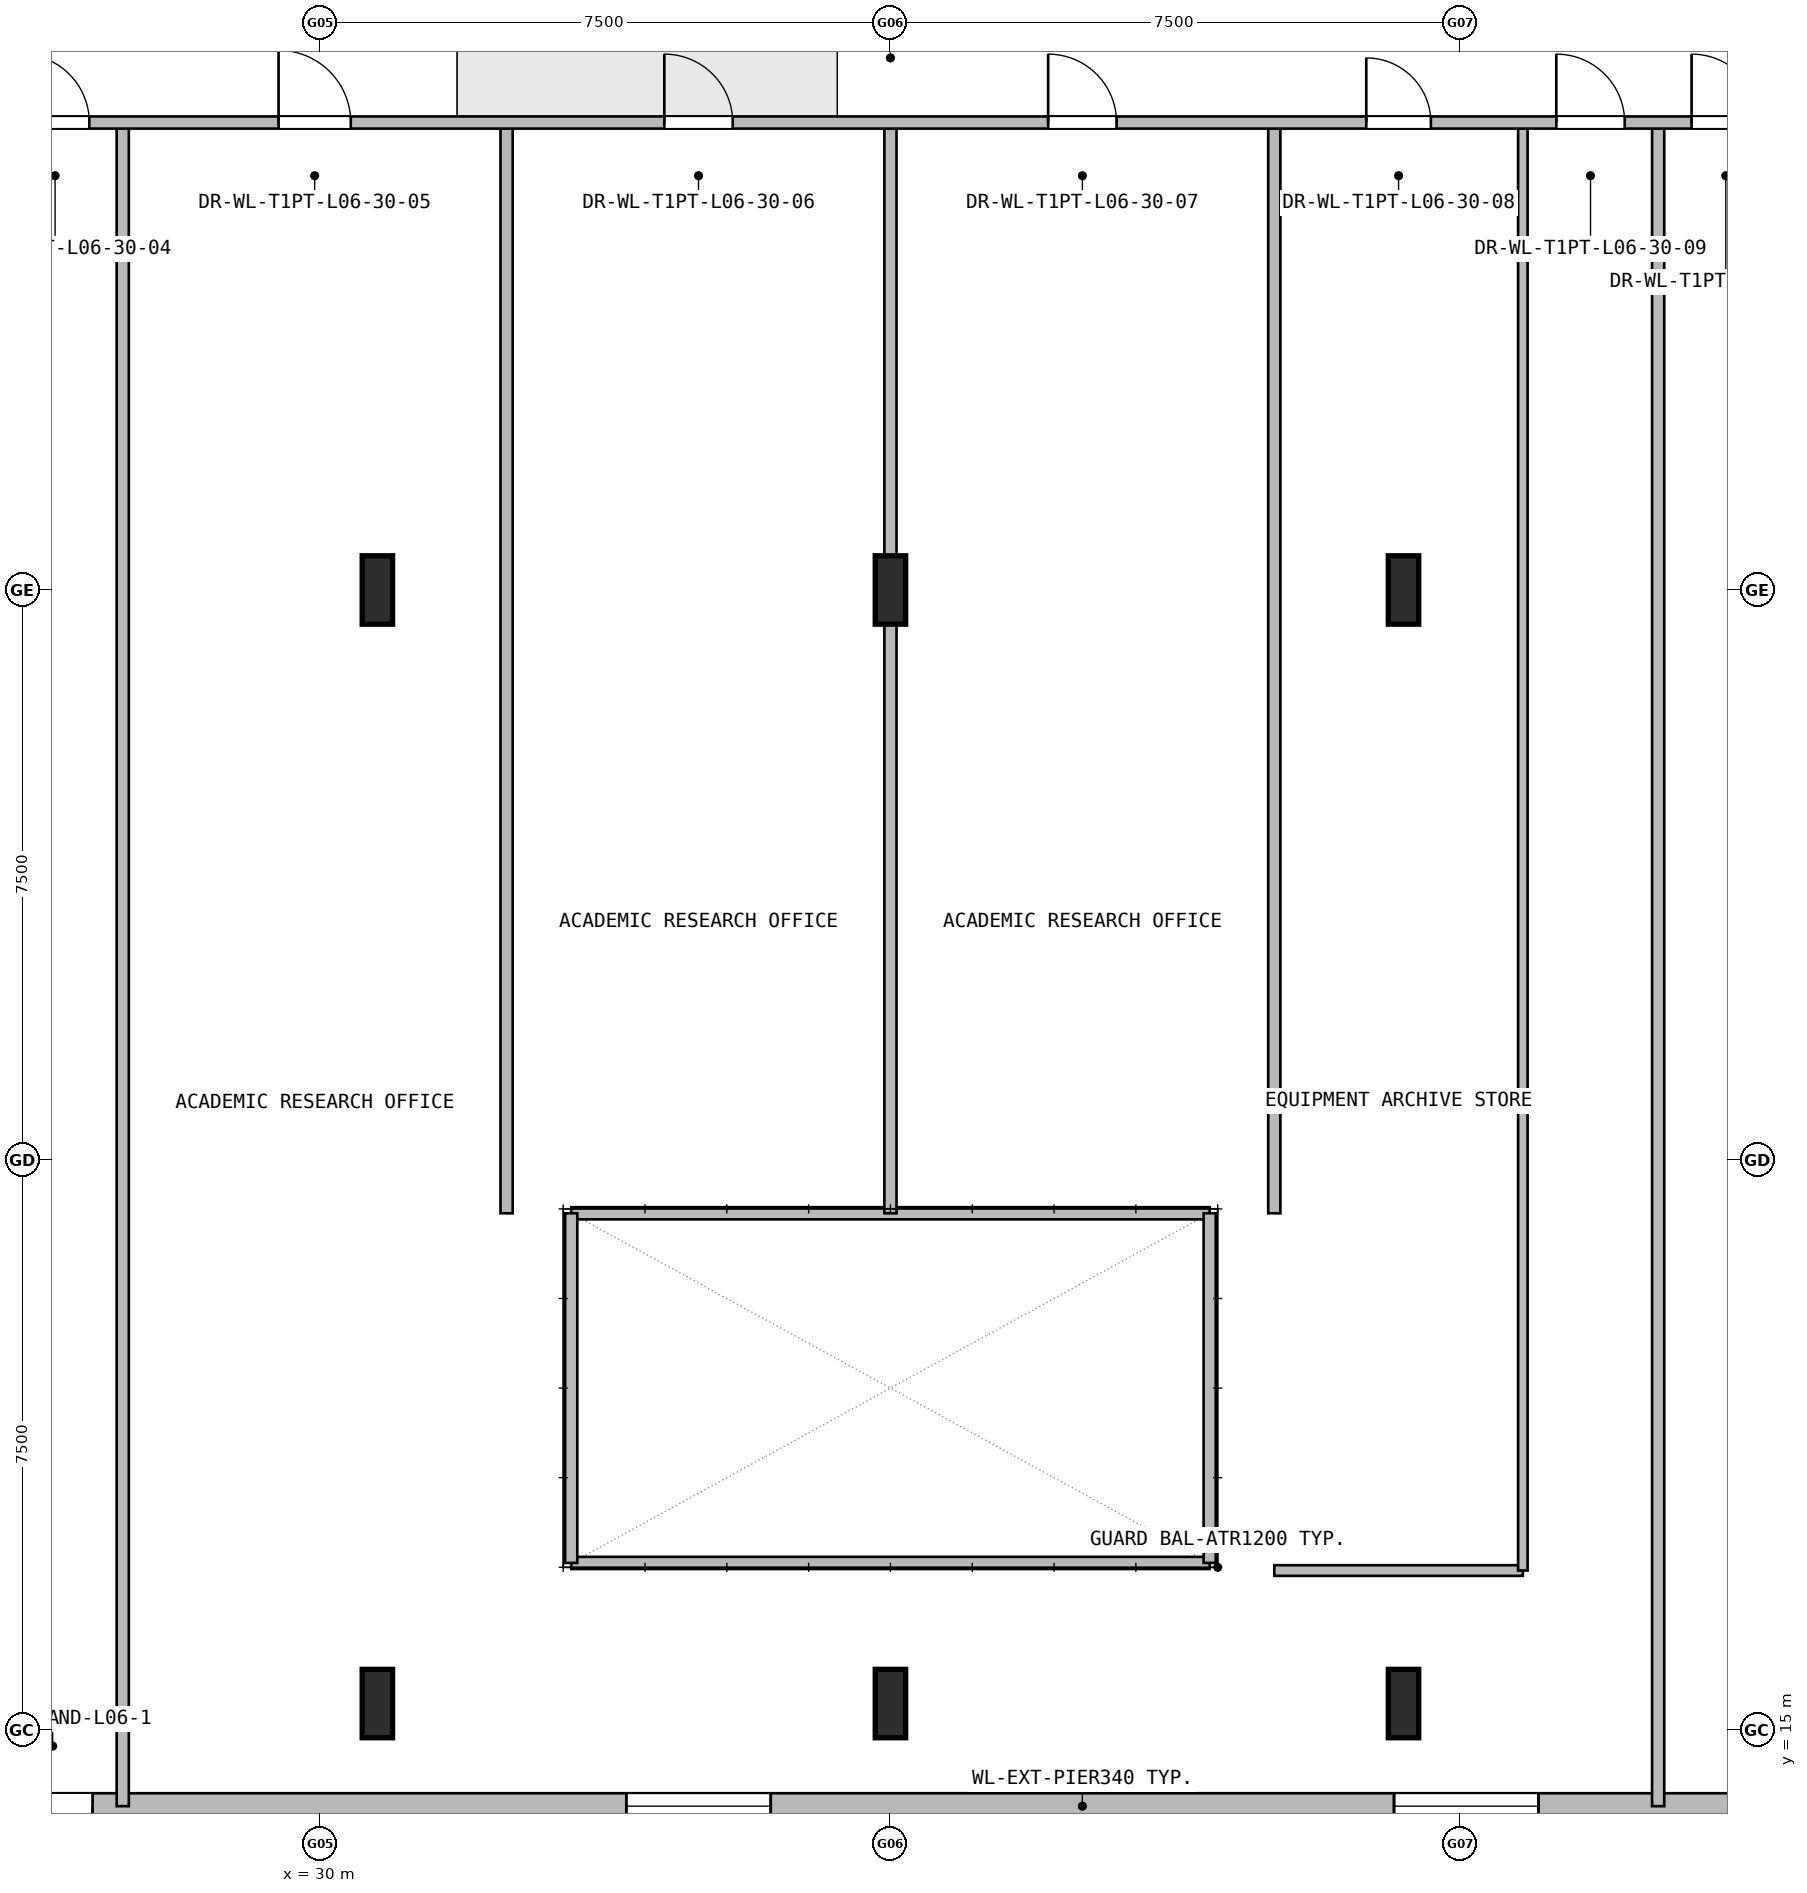
"""IFC4 building model, lengths in metres.
Left out: names, types, materials, properties, quantities, classifications, styles, units other than length and angle.
Written with IfcOpenShell. Run it as: python <this file> out.ifc"""

import sys

from ifc_helpers import new_model, si_unit, direction, frame, frame_2d, origin, origin_2d, place, context, subcontext, project, spatial, rectangle, i_section, extrude, element, fill, save


model = new_model("IFC4")
c1 = context("Model", 3, precision=1e-05, world=origin(), true_north=direction((0.0, 1.0)))
c2 = subcontext(c1, "Body", "Model", "MODEL_VIEW")
j1 = project(units=[si_unit("LENGTHUNIT", "METRE"), si_unit("PLANEANGLEUNIT", "RADIAN")], contexts=[c1])
p1 = place(None, origin())
s1 = spatial("IfcSite", under=j1, at=p1, CompositionType="ELEMENT")
p2 = place(p1, origin())
s2 = spatial("IfcBuilding", under=s1, at=p2, CompositionType="ELEMENT")
p3 = place(p2, frame((0.0, 0.0, 30.6)))
s3 = spatial("IfcBuildingStorey", under=s2, at=p3, CompositionType="ELEMENT", Elevation=30.6)
for number, where, z_axis, x_axis in (
    (1, (30.75, 15.35, 0.0), (0.0, 0.0, 1.0), (1.0, 0.0, 0.0)),
    (2, (30.75, 30.0, 0.0), (0.0, 0.0, 1.0), (1.0, 0.0, 0.0)),
):
    element("IfcColumn", number, at=place(p3, frame(where, z_axis=z_axis, x_axis=x_axis)), inside=s3, PredefinedType="COLUMN", context=c2, shape_type="SweptSolid", body=[
        extrude(i_section(OverallWidth=0.4, OverallDepth=0.9, WebThickness=0.02, FlangeThickness=0.036, at=origin_2d()), origin(), (0.0, 0.0, 1.0), 3.3),
    ])
for number, where, z_axis, x_axis in (
    (3, (37.5, 15.35, -0.25), (0.0, 0.0, 1.0), (1.0, 0.0, 0.0)),
    (4, (37.5, 30.0, -0.25), (0.0, 0.0, 1.0), (1.0, 0.0, 0.0)),
):
    element("IfcColumn", number, at=place(p3, frame(where, z_axis=z_axis, x_axis=x_axis)), inside=s3, PredefinedType="COLUMN", context=c2, shape_type="SweptSolid", body=[
        extrude(i_section(OverallWidth=0.4, OverallDepth=0.9, WebThickness=0.02, FlangeThickness=0.036, at=origin_2d()), origin(), (0.0, 0.0, 1.0), 3.55),
    ])
for number, where, z_axis, x_axis in (
    (5, (44.25, 15.35, 0.0), (0.0, 0.0, 1.0), (1.0, 0.0, 0.0)),
    (6, (44.25, 30.0, 0.0), (0.0, 0.0, 1.0), (1.0, 0.0, 0.0)),
):
    element("IfcColumn", number, at=place(p3, frame(where, z_axis=z_axis, x_axis=x_axis)), inside=s3, PredefinedType="COLUMN", context=c2, shape_type="SweptSolid", body=[
        extrude(i_section(OverallWidth=0.4, OverallDepth=0.9, WebThickness=0.02, FlangeThickness=0.036, at=origin_2d()), origin(), (0.0, 0.0, 1.0), 3.3),
    ])
p4 = place(p3, frame((62.2, 14.0, 0.0), z_axis=(0.0, 0.0, 1.0), x_axis=(-1.0, 0.0, 0.0)))
e7 = element("IfcWall", 7, at=p4, inside=s3, PredefinedType="SOLIDWALL", context=c2, shape_type="SweptSolid", body=[
    extrude(rectangle(XDim=49.4, YDim=0.34, at=frame_2d((24.7, 0.0))), origin(), (0.0, 0.0, 1.0), 3.03),
])
p5 = place(p4, frame((35.197, 0.0, 0.0)))
e8 = element("IfcOpeningElement", 8, at=p5, cuts=e7, PredefinedType="OPENING", context=c2, shape_type="SweptSolid", body=[
    extrude(rectangle(XDim=1.05, YDim=2.1, at=frame_2d((0.525, 1.05))), frame((0.0, 0.18, 0.0), z_axis=(0.0, -1.0, 0.0), x_axis=(1.0, 0.0, 0.0)), (0.0, 0.0, 1.0), 0.36),
])
p6 = place(p4, frame((40.23, 0.0, 0.8)))
e9 = element("IfcOpeningElement", 9, at=p6, cuts=e7, PredefinedType="OPENING", context=c2, shape_type="SweptSolid", body=[
    extrude(rectangle(XDim=1.1, YDim=1.5, at=frame_2d((0.55, 0.75))), frame((0.0, 0.18, 0.0), z_axis=(0.0, -1.0, 0.0), x_axis=(1.0, 0.0, 0.0)), (0.0, 0.0, 1.0), 0.36),
])
p7 = place(p4, frame((36.614, 0.0, 0.8)))
e10 = element("IfcOpeningElement", 10, at=p7, cuts=e7, PredefinedType="OPENING", context=c2, shape_type="SweptSolid", body=[
    extrude(rectangle(XDim=1.9, YDim=1.85, at=frame_2d((0.95, 0.925))), frame((0.0, 0.18, 0.0), z_axis=(0.0, -1.0, 0.0), x_axis=(1.0, 0.0, 0.0)), (0.0, 0.0, 1.0), 0.36),
])
p8 = place(p4, frame((26.275, 0.0, 0.8)))
e11 = element("IfcOpeningElement", 11, at=p8, cuts=e7, PredefinedType="OPENING", context=c2, shape_type="SweptSolid", body=[
    extrude(rectangle(XDim=1.9, YDim=1.85, at=frame_2d((0.95, 0.925))), frame((0.0, 0.18, 0.0), z_axis=(0.0, -1.0, 0.0), x_axis=(1.0, 0.0, 0.0)), (0.0, 0.0, 1.0), 0.36),
])
p9 = place(p4, frame((16.175, 0.0, 0.8)))
e12 = element("IfcOpeningElement", 12, at=p9, cuts=e7, PredefinedType="OPENING", context=c2, shape_type="SweptSolid", body=[
    extrude(rectangle(XDim=1.9, YDim=1.85, at=frame_2d((0.95, 0.925))), frame((0.0, 0.18, 0.0), z_axis=(0.0, -1.0, 0.0), x_axis=(1.0, 0.0, 0.0)), (0.0, 0.0, 1.0), 0.36),
])
p10 = place(p4, frame((11.125, 0.0, 0.8)))
e13 = element("IfcOpeningElement", 13, at=p10, cuts=e7, PredefinedType="OPENING", context=c2, shape_type="SweptSolid", body=[
    extrude(rectangle(XDim=1.9, YDim=1.85, at=frame_2d((0.95, 0.925))), frame((0.0, 0.18, 0.0), z_axis=(0.0, -1.0, 0.0), x_axis=(1.0, 0.0, 0.0)), (0.0, 0.0, 1.0), 0.36),
])
p11 = place(p4, frame((8.07, 0.0, 0.8)))
e14 = element("IfcOpeningElement", 14, at=p11, cuts=e7, PredefinedType="OPENING", context=c2, shape_type="SweptSolid", body=[
    extrude(rectangle(XDim=1.1, YDim=1.5, at=frame_2d((0.55, 0.75))), frame((0.0, 0.18, 0.0), z_axis=(0.0, -1.0, 0.0), x_axis=(1.0, 0.0, 0.0)), (0.0, 0.0, 1.0), 0.36),
])
for number, where, z_axis, x_axis in (
    (15, (33.3, 17.2, 0.0), (0.0, 0.0, 1.0), (1.0, 0.0, 0.0)),
    (16, (33.3, 21.8, 0.0), (0.0, 0.0, 1.0), (1.0, 0.0, 0.0)),
):
    element("IfcWall", number, at=place(p3, frame(where, z_axis=z_axis, x_axis=x_axis)), inside=s3, PredefinedType="PARTITIONING", context=c2, shape_type="SweptSolid", body=[
        extrude(rectangle(XDim=8.4, YDim=0.16, at=frame_2d((4.2, 0.0))), origin(), (0.0, 0.0, 1.0), 3.03),
    ])
for number, where, z_axis, x_axis in (
    (17, (33.3, 17.2, 0.0), (0.0, 0.0, 1.0), (0.0, 1.0, 0.0)),
    (18, (41.7, 17.2, 0.0), (0.0, 0.0, 1.0), (0.0, 1.0, 0.0)),
):
    element("IfcWall", number, at=place(p3, frame(where, z_axis=z_axis, x_axis=x_axis)), inside=s3, PredefinedType="PARTITIONING", context=c2, shape_type="SweptSolid", body=[
        extrude(rectangle(XDim=4.6, YDim=0.16, at=frame_2d((2.3, 0.0))), origin(), (0.0, 0.0, 1.0), 3.03),
    ])
p12 = place(p3, frame((27.4, 14.0, 0.0), z_axis=(0.0, 0.0, 1.0), x_axis=(0.0, 1.0, 0.0)))
e19 = element("IfcWall", 19, at=p12, inside=s3, PredefinedType="PARTITIONING", context=c2, shape_type="SweptSolid", body=[
    extrude(rectangle(XDim=22.15, YDim=0.16, at=frame_2d((11.075, 0.0))), origin(), (0.0, 0.0, 1.0), 3.03),
])
p13 = place(p3, frame((32.45, 21.8, 0.0), z_axis=(0.0, 0.0, 1.0), x_axis=(0.0, 1.0, 0.0)))
e20 = element("IfcWall", 20, at=p13, inside=s3, PredefinedType="PARTITIONING", context=c2, shape_type="SweptSolid", body=[
    extrude(rectangle(XDim=14.35, YDim=0.16, at=frame_2d((7.175, 0.0))), origin(), (0.0, 0.0, 1.0), 3.03),
])
p14 = place(p3, frame((37.5, 21.8, 0.0), z_axis=(0.0, 0.0, 1.0), x_axis=(0.0, 1.0, 0.0)))
e21 = element("IfcWall", 21, at=p14, inside=s3, PredefinedType="PARTITIONING", context=c2, shape_type="SweptSolid", body=[
    extrude(rectangle(XDim=14.35, YDim=0.16, at=frame_2d((7.175, 0.0))), origin(), (0.0, 0.0, 1.0), 2.33),
])
p15 = place(p3, frame((42.55, 21.8, 0.0), z_axis=(0.0, 0.0, 1.0), x_axis=(0.0, 1.0, 0.0)))
e22 = element("IfcWall", 22, at=p15, inside=s3, PredefinedType="PARTITIONING", context=c2, shape_type="SweptSolid", body=[
    extrude(rectangle(XDim=14.35, YDim=0.16, at=frame_2d((7.175, 0.0))), origin(), (0.0, 0.0, 1.0), 3.03),
])
p16 = place(p3, frame((42.55, 17.1, 0.0), z_axis=(0.0, 0.0, 1.0), x_axis=(1.0, 0.0, 0.0)))
e23 = element("IfcWall", 23, at=p16, inside=s3, PredefinedType="PARTITIONING", context=c2, shape_type="SweptSolid", body=[
    extrude(rectangle(XDim=3.27, YDim=0.14, at=frame_2d((1.635, 0.0))), origin(), (0.0, 0.0, 1.0), 3.03),
])
p17 = place(p3, frame((45.82, 17.1, 0.0), z_axis=(0.0, 0.0, 1.0), x_axis=(0.0, 1.0, 0.0)))
e24 = element("IfcWall", 24, at=p17, inside=s3, PredefinedType="PARTITIONING", context=c2, shape_type="SweptSolid", body=[
    extrude(rectangle(XDim=19.05, YDim=0.125, at=frame_2d((9.525, 0.0))), origin(), (0.0, 0.0, 1.0), 3.03),
])
p18 = place(p3, frame((47.6, 14.0, 0.0), z_axis=(0.0, 0.0, 1.0), x_axis=(0.0, 1.0, 0.0)))
e25 = element("IfcWall", 25, at=p18, inside=s3, PredefinedType="PARTITIONING", context=c2, shape_type="SweptSolid", body=[
    extrude(rectangle(XDim=22.15, YDim=0.16, at=frame_2d((11.075, 0.0))), origin(), (0.0, 0.0, 1.0), 3.03),
])
p19 = place(p3, frame((17.3, 36.15, 0.0), z_axis=(0.0, 0.0, 1.0), x_axis=(1.0, 0.0, 0.0)))
e26 = element("IfcWall", 26, at=p19, inside=s3, PredefinedType="PARTITIONING", context=c2, shape_type="SweptSolid", body=[
    extrude(rectangle(XDim=40.4, YDim=0.16, at=frame_2d((20.2, 0.0))), origin(), (0.0, 0.0, 1.0), 3.03),
])
p20 = place(p19, frame((2.99, 0.0, 0.0)))
e27 = element("IfcOpeningElement", 27, at=p20, cuts=e26, PredefinedType="OPENING", context=c2, shape_type="SweptSolid", body=[
    extrude(rectangle(XDim=0.85, YDim=2.05, at=frame_2d((0.425, 1.025))), frame((0.0, 0.09, 0.0), z_axis=(0.0, -1.0, 0.0), x_axis=(1.0, 0.0, 0.0)), (0.0, 0.0, 1.0), 0.18),
])
p21 = place(p19, frame((0.44, 0.0, 0.0)))
e28 = element("IfcOpeningElement", 28, at=p21, cuts=e26, PredefinedType="OPENING", context=c2, shape_type="SweptSolid", body=[
    extrude(rectangle(XDim=0.9, YDim=2.05, at=frame_2d((0.45, 1.025))), frame((0.0, 0.09, 0.0), z_axis=(0.0, -1.0, 0.0), x_axis=(1.0, 0.0, 0.0)), (0.0, 0.0, 1.0), 0.18),
])
p22 = place(p19, frame((6.26, 0.0, 0.0)))
e29 = element("IfcOpeningElement", 29, at=p22, cuts=e26, PredefinedType="OPENING", context=c2, shape_type="SweptSolid", body=[
    extrude(rectangle(XDim=0.85, YDim=2.05, at=frame_2d((0.425, 1.025))), frame((0.0, 0.09, 0.0), z_axis=(0.0, -1.0, 0.0), x_axis=(1.0, 0.0, 0.0)), (0.0, 0.0, 1.0), 0.18),
])
p23 = place(p19, frame((8.76, 0.0, 0.0)))
e30 = element("IfcOpeningElement", 30, at=p23, cuts=e26, PredefinedType="OPENING", context=c2, shape_type="SweptSolid", body=[
    extrude(rectangle(XDim=0.9, YDim=2.05, at=frame_2d((0.45, 1.025))), frame((0.0, 0.09, 0.0), z_axis=(0.0, -1.0, 0.0), x_axis=(1.0, 0.0, 0.0)), (0.0, 0.0, 1.0), 0.18),
])
p24 = place(p19, frame((12.15, 0.0, 0.0)))
e31 = element("IfcOpeningElement", 31, at=p24, cuts=e26, PredefinedType="OPENING", context=c2, shape_type="SweptSolid", body=[
    extrude(rectangle(XDim=0.95, YDim=2.1, at=frame_2d((0.475, 1.05))), frame((0.0, 0.09, 0.0), z_axis=(0.0, -1.0, 0.0), x_axis=(1.0, 0.0, 0.0)), (0.0, 0.0, 1.0), 0.18),
])
p25 = place(p19, frame((17.225, 0.0, 0.0)))
e32 = element("IfcOpeningElement", 32, at=p25, cuts=e26, PredefinedType="OPENING", context=c2, shape_type="SweptSolid", body=[
    extrude(rectangle(XDim=0.9, YDim=2.05, at=frame_2d((0.45, 1.025))), frame((0.0, 0.09, 0.0), z_axis=(0.0, -1.0, 0.0), x_axis=(1.0, 0.0, 0.0)), (0.0, 0.0, 1.0), 0.18),
])
p26 = place(p19, frame((22.275, 0.0, 0.0)))
e33 = element("IfcOpeningElement", 33, at=p26, cuts=e26, PredefinedType="OPENING", context=c2, shape_type="SweptSolid", body=[
    extrude(rectangle(XDim=0.9, YDim=2.05, at=frame_2d((0.45, 1.025))), frame((0.0, 0.09, 0.0), z_axis=(0.0, -1.0, 0.0), x_axis=(1.0, 0.0, 0.0)), (0.0, 0.0, 1.0), 0.18),
])
p27 = place(p19, frame((26.46, 0.0, 0.0)))
e34 = element("IfcOpeningElement", 34, at=p27, cuts=e26, PredefinedType="OPENING", context=c2, shape_type="SweptSolid", body=[
    extrude(rectangle(XDim=0.85, YDim=2.05, at=frame_2d((0.425, 1.025))), frame((0.0, 0.09, 0.0), z_axis=(0.0, -1.0, 0.0), x_axis=(1.0, 0.0, 0.0)), (0.0, 0.0, 1.0), 0.18),
])
p28 = place(p19, frame((28.96, 0.0, 0.0)))
e35 = element("IfcOpeningElement", 35, at=p28, cuts=e26, PredefinedType="OPENING", context=c2, shape_type="SweptSolid", body=[
    extrude(rectangle(XDim=0.9, YDim=2.05, at=frame_2d((0.45, 1.025))), frame((0.0, 0.09, 0.0), z_axis=(0.0, -1.0, 0.0), x_axis=(1.0, 0.0, 0.0)), (0.0, 0.0, 1.0), 0.18),
])
p29 = place(p19, frame((33.29, 0.0, 0.0)))
e36 = element("IfcOpeningElement", 36, at=p29, cuts=e26, PredefinedType="OPENING", context=c2, shape_type="SweptSolid", body=[
    extrude(rectangle(XDim=0.85, YDim=2.05, at=frame_2d((0.425, 1.025))), frame((0.0, 0.09, 0.0), z_axis=(0.0, -1.0, 0.0), x_axis=(1.0, 0.0, 0.0)), (0.0, 0.0, 1.0), 0.18),
])
p30 = place(p19, frame((30.74, 0.0, 0.0)))
e37 = element("IfcOpeningElement", 37, at=p30, cuts=e26, PredefinedType="OPENING", context=c2, shape_type="SweptSolid", body=[
    extrude(rectangle(XDim=0.9, YDim=2.05, at=frame_2d((0.45, 1.025))), frame((0.0, 0.09, 0.0), z_axis=(0.0, -1.0, 0.0), x_axis=(1.0, 0.0, 0.0)), (0.0, 0.0, 1.0), 0.18),
])
p31 = place(p19, frame((36.56, 0.0, 0.0)))
e38 = element("IfcOpeningElement", 38, at=p31, cuts=e26, PredefinedType="OPENING", context=c2, shape_type="SweptSolid", body=[
    extrude(rectangle(XDim=0.85, YDim=2.05, at=frame_2d((0.425, 1.025))), frame((0.0, 0.09, 0.0), z_axis=(0.0, -1.0, 0.0), x_axis=(1.0, 0.0, 0.0)), (0.0, 0.0, 1.0), 0.18),
])
p32 = place(p19, frame((39.06, 0.0, 0.0)))
e39 = element("IfcOpeningElement", 39, at=p32, cuts=e26, PredefinedType="OPENING", context=c2, shape_type="SweptSolid", body=[
    extrude(rectangle(XDim=0.9, YDim=2.05, at=frame_2d((0.45, 1.025))), frame((0.0, 0.09, 0.0), z_axis=(0.0, -1.0, 0.0), x_axis=(1.0, 0.0, 0.0)), (0.0, 0.0, 1.0), 0.18),
])
p33 = place(p5, origin())
e40 = element("IfcDoor", 40, at=p33, inside=s3, OperationType="SINGLE_SWING_LEFT", PredefinedType="DOOR", context=c2, shape_type="SweptSolid", body=[
    extrude(rectangle(XDim=1.05, YDim=2.1, at=frame_2d((0.525, 1.05))), frame((0.0, 0.025, 0.0), z_axis=(0.0, -1.0, 0.0), x_axis=(1.0, 0.0, 0.0)), (0.0, 0.0, 1.0), 0.05),
])
fill(e8, e40)
p34 = place(p8, origin())
e41 = element("IfcWindow", 41, at=p34, inside=s3, PartitioningType="SINGLE_PANEL", PredefinedType="WINDOW", context=c2, shape_type="SweptSolid", body=[
    extrude(rectangle(XDim=1.9, YDim=1.85, at=frame_2d((0.95, 0.925))), frame((0.0, 0.03, 0.0), z_axis=(0.0, -1.0, 0.0), x_axis=(1.0, 0.0, 0.0)), (0.0, 0.0, 1.0), 0.06),
])
fill(e11, e41)
p35 = place(p9, origin())
e42 = element("IfcWindow", 42, at=p35, inside=s3, PartitioningType="SINGLE_PANEL", PredefinedType="WINDOW", context=c2, shape_type="SweptSolid", body=[
    extrude(rectangle(XDim=1.9, YDim=1.85, at=frame_2d((0.95, 0.925))), frame((0.0, 0.03, 0.0), z_axis=(0.0, -1.0, 0.0), x_axis=(1.0, 0.0, 0.0)), (0.0, 0.0, 1.0), 0.06),
])
fill(e12, e42)
p36 = place(p23, origin())
e43 = element("IfcDoor", 43, at=p36, inside=s3, OperationType="SINGLE_SWING_LEFT", PredefinedType="DOOR", context=c2, shape_type="SweptSolid", body=[
    extrude(rectangle(XDim=0.9, YDim=2.05, at=frame_2d((0.45, 1.025))), frame((0.0, 0.025, 0.0), z_axis=(0.0, -1.0, 0.0), x_axis=(1.0, 0.0, 0.0)), (0.0, 0.0, 1.0), 0.05),
])
fill(e30, e43)
p37 = place(p24, origin())
e44 = element("IfcDoor", 44, at=p37, inside=s3, OperationType="SINGLE_SWING_RIGHT", PredefinedType="DOOR", context=c2, shape_type="SweptSolid", body=[
    extrude(rectangle(XDim=0.95, YDim=2.1, at=frame_2d((0.475, 1.05))), frame((0.0, 0.025, 0.0), z_axis=(0.0, -1.0, 0.0), x_axis=(1.0, 0.0, 0.0)), (0.0, 0.0, 1.0), 0.05),
])
fill(e31, e44)
p38 = place(p25, origin())
e45 = element("IfcDoor", 45, at=p38, inside=s3, OperationType="SINGLE_SWING_LEFT", PredefinedType="DOOR", context=c2, shape_type="SweptSolid", body=[
    extrude(rectangle(XDim=0.9, YDim=2.05, at=frame_2d((0.45, 1.025))), frame((0.0, 0.025, 0.0), z_axis=(0.0, -1.0, 0.0), x_axis=(1.0, 0.0, 0.0)), (0.0, 0.0, 1.0), 0.05),
])
fill(e32, e45)
p39 = place(p26, origin())
e46 = element("IfcDoor", 46, at=p39, inside=s3, OperationType="SINGLE_SWING_RIGHT", PredefinedType="DOOR", context=c2, shape_type="SweptSolid", body=[
    extrude(rectangle(XDim=0.9, YDim=2.05, at=frame_2d((0.45, 1.025))), frame((0.0, 0.025, 0.0), z_axis=(0.0, -1.0, 0.0), x_axis=(1.0, 0.0, 0.0)), (0.0, 0.0, 1.0), 0.05),
])
fill(e33, e46)
p40 = place(p27, origin())
e47 = element("IfcDoor", 47, at=p40, inside=s3, OperationType="SINGLE_SWING_LEFT", PredefinedType="DOOR", context=c2, shape_type="SweptSolid", body=[
    extrude(rectangle(XDim=0.85, YDim=2.05, at=frame_2d((0.425, 1.025))), frame((0.0, 0.025, 0.0), z_axis=(0.0, -1.0, 0.0), x_axis=(1.0, 0.0, 0.0)), (0.0, 0.0, 1.0), 0.05),
])
fill(e34, e47)
p41 = place(p28, origin())
e48 = element("IfcDoor", 48, at=p41, inside=s3, OperationType="SINGLE_SWING_RIGHT", PredefinedType="DOOR", context=c2, shape_type="SweptSolid", body=[
    extrude(rectangle(XDim=0.9, YDim=2.05, at=frame_2d((0.45, 1.025))), frame((0.0, 0.025, 0.0), z_axis=(0.0, -1.0, 0.0), x_axis=(1.0, 0.0, 0.0)), (0.0, 0.0, 1.0), 0.05),
])
fill(e35, e48)
p42 = place(p30, origin())
e49 = element("IfcDoor", 49, at=p42, inside=s3, OperationType="SINGLE_SWING_RIGHT", PredefinedType="DOOR", context=c2, shape_type="SweptSolid", body=[
    extrude(rectangle(XDim=0.9, YDim=2.05, at=frame_2d((0.45, 1.025))), frame((0.0, 0.025, 0.0), z_axis=(0.0, -1.0, 0.0), x_axis=(1.0, 0.0, 0.0)), (0.0, 0.0, 1.0), 0.05),
])
fill(e37, e49)
save(model, sys.argv[1])
